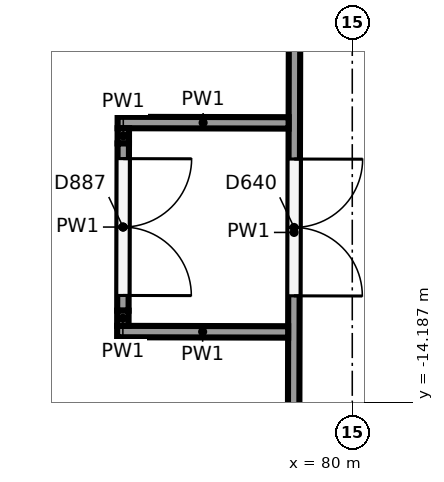
"""IFC4 building model, lengths in metres.
Left out: names, types, materials, properties, quantities, classifications, styles, units other than length and angle.
Written with IfcOpenShell. Run it as: python <this file> out.ifc"""

import sys

from ifc_helpers import new_model, si_unit, direction, frame, frame_2d, origin, place, context, subcontext, project, spatial, rectangle, extrude, element, fill, save


model = new_model("IFC4")
c1 = context("Model", 3, precision=1e-05, world=origin(), true_north=direction((0.0, 1.0)))
c2 = subcontext(c1, "Body", "Model", "MODEL_VIEW")
j1 = project(units=[si_unit("LENGTHUNIT", "METRE"), si_unit("PLANEANGLEUNIT", "RADIAN")], contexts=[c1])
p1 = place(None, origin())
s1 = spatial("IfcSite", under=j1, at=p1, CompositionType="ELEMENT")
p2 = place(p1, origin())
s2 = spatial("IfcBuilding", under=s1, at=p2, CompositionType="ELEMENT")
p3 = place(p2, frame((0.0, 0.0, 6.5)))
s3 = spatial("IfcBuildingStorey", under=s2, at=p3, CompositionType="ELEMENT", Elevation=6.5)
p4 = place(p3, frame((79.247, -6.537, 0.0), z_axis=(0.0, 0.0, 1.0), x_axis=(-0.002276512155, -0.999997408743, 0.0)))
e1 = element("IfcWall", 1, at=p4, inside=s3, PredefinedType="PARTITIONING", context=c2, shape_type="SweptSolid", body=[
    extrude(rectangle(XDim=10.832, YDim=0.15, at=frame_2d((5.416, 0.0))), origin(), (0.0, 0.0, 1.0), 5.15),
])
p5 = place(p4, frame((4.45, 0.0, 0.0)))
e2 = element("IfcOpeningElement", 2, at=p5, cuts=e1, PredefinedType="OPENING", context=c2, shape_type="SweptSolid", body=[
    extrude(rectangle(XDim=1.8, YDim=2.1, at=frame_2d((0.9, 1.05))), frame((0.0, 0.085, 0.0), z_axis=(0.0, -1.0, 0.0), x_axis=(1.0, 0.0, 0.0)), (0.0, 0.0, 1.0), 0.17),
])
for number, where, z_axis, x_axis in (
    (3, (79.163, -10.511, 0.0), (0.0, 0.0, 1.0), (-1.0, 0.002, 0.0)),
    (4, (79.156, -13.261, 0.0), (0.0, 0.0, 1.0), (-1.0, 0.002, 0.0)),
):
    element("IfcWall", number, at=place(p3, frame(where, z_axis=z_axis, x_axis=x_axis)), inside=s3, PredefinedType="PARTITIONING", context=c2, shape_type="SweptSolid", body=[
        extrude(rectangle(XDim=2.25, YDim=0.15, at=frame_2d((1.125, 0.0))), origin(), (0.0, 0.0, 1.0), 5.15),
    ])
p6 = place(p3, frame((76.988, -10.582, 0.0), z_axis=(0.0, 0.0, 1.0), x_axis=(-0.002441995161, -0.999997018325, 0.0)))
e5 = element("IfcWall", 5, at=p6, inside=s3, PredefinedType="PARTITIONING", context=c2, shape_type="SweptSolid", body=[
    extrude(rectangle(XDim=0.2, YDim=0.15, at=frame_2d((0.1, 0.0))), origin(), (0.0, 0.0, 1.0), 5.15),
])
p7 = place(p3, frame((76.987, -10.781, 0.0), z_axis=(0.0, 0.0, 1.0), x_axis=(-0.002330220038, -0.999997285034, 0.0)))
e6 = element("IfcWall", 6, at=p7, inside=s3, PredefinedType="PARTITIONING", context=c2, shape_type="SweptSolid", body=[
    extrude(rectangle(XDim=2.2, YDim=0.15, at=frame_2d((1.1, 0.0))), origin(), (0.0, 0.0, 1.0), 5.15),
])
p8 = place(p7, frame((0.2, 0.0, 0.0)))
e7 = element("IfcOpeningElement", 7, at=p8, cuts=e6, PredefinedType="OPENING", context=c2, shape_type="SweptSolid", body=[
    extrude(rectangle(XDim=1.8, YDim=2.1, at=frame_2d((0.9, 1.05))), frame((0.0, 0.085, 0.0), z_axis=(0.0, -1.0, 0.0), x_axis=(1.0, 0.0, 0.0)), (0.0, 0.0, 1.0), 0.17),
])
p9 = place(p3, frame((76.982, -12.982, 0.0), z_axis=(0.0, 0.0, 1.0), x_axis=(-0.002441995161, -0.999997018325, 0.0)))
e8 = element("IfcWall", 8, at=p9, inside=s3, PredefinedType="PARTITIONING", context=c2, shape_type="SweptSolid", body=[
    extrude(rectangle(XDim=0.2, YDim=0.15, at=frame_2d((0.1, 0.0))), origin(), (0.0, 0.0, 1.0), 5.15),
])
p10 = place(p5, origin())
e9 = element("IfcDoor", 9, at=p10, inside=s3, OperationType="DOUBLE_DOOR_SINGLE_SWING", PredefinedType="DOOR", context=c2, shape_type="SweptSolid", body=[
    extrude(rectangle(XDim=1.8, YDim=2.1, at=frame_2d((0.9, 1.05))), frame((0.0, 0.025, 0.0), z_axis=(0.0, -1.0, 0.0), x_axis=(1.0, 0.0, 0.0)), (0.0, 0.0, 1.0), 0.05),
])
fill(e2, e9)
p11 = place(p8, origin())
e10 = element("IfcDoor", 10, at=p11, inside=s3, OperationType="DOUBLE_DOOR_SINGLE_SWING", PredefinedType="DOOR", context=c2, shape_type="SweptSolid", body=[
    extrude(rectangle(XDim=1.8, YDim=2.1, at=frame_2d((0.9, 1.05))), frame((0.0, 0.025, 0.0), z_axis=(0.0, -1.0, 0.0), x_axis=(1.0, 0.0, 0.0)), (0.0, 0.0, 1.0), 0.05),
])
fill(e7, e10)
save(model, sys.argv[1])
